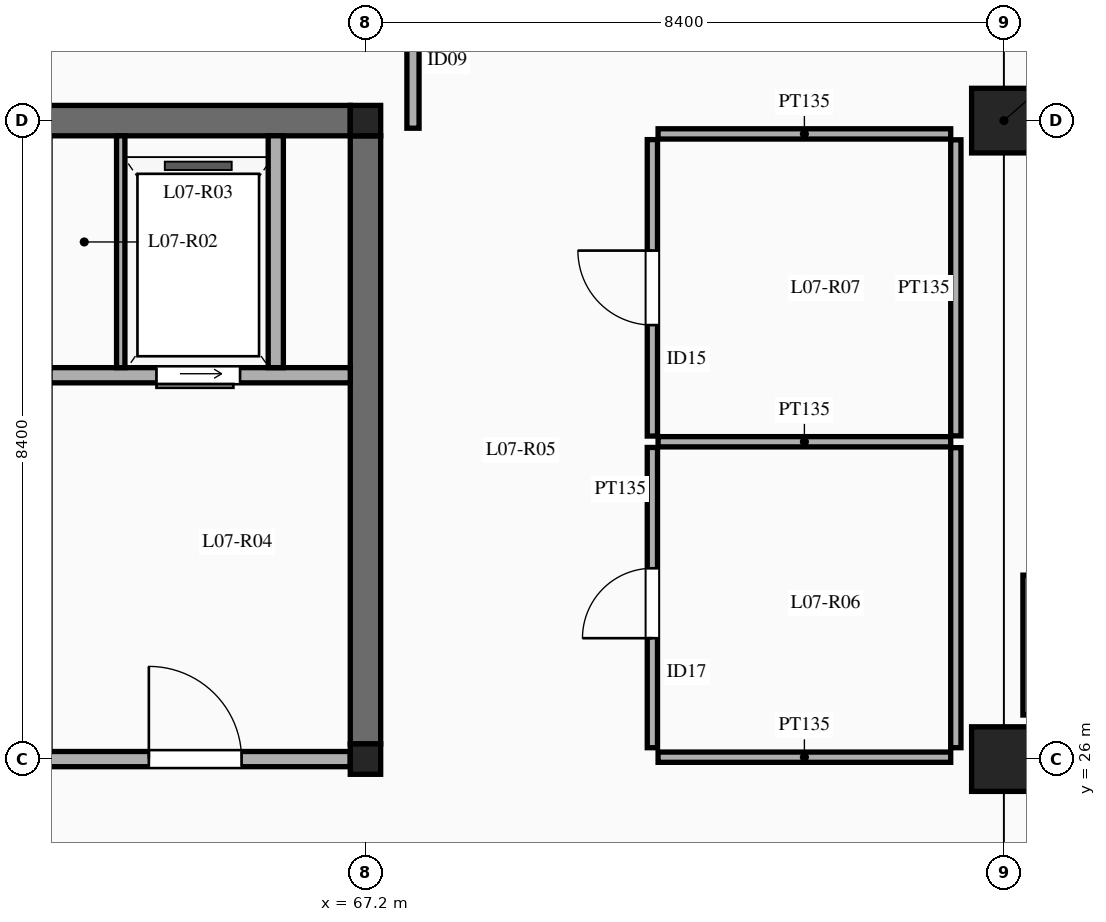
"""IFC4 building model, lengths in metres.
Left out: names, types, materials, properties, quantities, classifications, styles, units other than length and angle.
Written with IfcOpenShell. Run it as: python <this file> out.ifc"""

import sys

from ifc_helpers import new_model, si_unit, direction, frame, frame_2d, origin, origin_2d, place, context, subcontext, project, spatial, rectangle, extrude, element, fill, save


model = new_model("IFC4")
c1 = context("Model", 3, precision=1e-05, world=origin(), true_north=direction((0.0, 1.0)))
c2 = subcontext(c1, "Body", "Model", "MODEL_VIEW")
j1 = project(units=[si_unit("LENGTHUNIT", "METRE"), si_unit("PLANEANGLEUNIT", "RADIAN")], contexts=[c1])
p1 = place(None, origin())
s1 = spatial("IfcSite", under=j1, at=p1, CompositionType="ELEMENT")
p2 = place(p1, origin())
s2 = spatial("IfcBuilding", under=s1, at=p2, CompositionType="ELEMENT")
p3 = place(p2, frame((0.0, 0.0, 33.0)))
s3 = spatial("IfcBuildingStorey", under=s2, at=p3, CompositionType="ELEMENT", Elevation=33.0)
for number, where, z_axis, x_axis in (
    (1, (67.2, 26.0, 0.0), (0.0, 0.0, 1.0), (1.0, 0.0, 0.0)),
    (2, (67.2, 34.4, 0.0), (0.0, 0.0, 1.0), (1.0, 0.0, 0.0)),
):
    element("IfcColumn", number, at=place(p3, frame(where, z_axis=z_axis, x_axis=x_axis)), inside=s3, PredefinedType="COLUMN", context=c2, shape_type="SweptSolid", body=[
        extrude(rectangle(XDim=0.4, YDim=0.4, at=origin_2d()), origin(), (0.0, 0.0, 1.0), 4.5),
    ])
for number, where, z_axis, x_axis in (
    (3, (75.6, 26.0, 0.0), (0.0, 0.0, 1.0), (1.0, 0.0, 0.0)),
    (4, (75.6, 34.4, 0.0), (0.0, 0.0, 1.0), (1.0, 0.0, 0.0)),
):
    element("IfcColumn", number, at=place(p3, frame(where, z_axis=z_axis, x_axis=x_axis)), inside=s3, PredefinedType="COLUMN", context=c2, shape_type="SweptSolid", body=[
        extrude(rectangle(XDim=0.85, YDim=0.85, at=origin_2d()), origin(), (0.0, 0.0, 1.0), 4.5),
    ])
for number, where, z_axis, x_axis in (
    (5, (67.2, 26.2, 0.0), (0.0, 0.0, 1.0), (0.0, 1.0, 0.0)),
    (6, (59.0, 34.4, 0.0), (0.0, 0.0, 1.0), (1.0, 0.0, 0.0)),
):
    element("IfcWall", number, at=place(p3, frame(where, z_axis=z_axis, x_axis=x_axis)), inside=s3, PredefinedType="SHEAR", context=c2, shape_type="SweptSolid", body=[
        extrude(rectangle(XDim=8.0, YDim=0.4, at=frame_2d((4.0, 0.0))), origin(), (0.0, 0.0, 1.0), 4.5),
    ])
p4 = place(p3, frame((59.0, 26.0, 0.0), z_axis=(0.0, 0.0, 1.0), x_axis=(1.0, 0.0, 0.0)))
e7 = element("IfcWall", 7, at=p4, inside=s3, PredefinedType="SOLIDWALL", context=c2, shape_type="SweptSolid", body=[
    extrude(rectangle(XDim=8.0, YDim=0.2, at=frame_2d((4.0, 0.0))), origin(), (0.0, 0.0, 1.0), 3.73),
])
p5 = place(p4, frame((1.55, 0.0, 0.0)))
e8 = element("IfcOpeningElement", 8, at=p5, cuts=e7, PredefinedType="OPENING", context=c2, shape_type="SweptSolid", body=[
    extrude(rectangle(XDim=1.15, YDim=2.15, at=frame_2d((0.575, 1.075))), frame((0.0, 0.11, 0.0), z_axis=(0.0, -1.0, 0.0), x_axis=(1.0, 0.0, 0.0)), (0.0, 0.0, 1.0), 0.22),
])
p6 = place(p4, frame((5.35, 0.0, 0.0)))
e9 = element("IfcOpeningElement", 9, at=p6, cuts=e7, PredefinedType="OPENING", context=c2, shape_type="SweptSolid", body=[
    extrude(rectangle(XDim=1.22, YDim=2.15, at=frame_2d((0.61, 1.075))), frame((0.0, 0.11, 0.0), z_axis=(0.0, -1.0, 0.0), x_axis=(1.0, 0.0, 0.0)), (0.0, 0.0, 1.0), 0.22),
])
p7 = place(p3, frame((63.05, 31.05, 0.0), z_axis=(0.0, 0.0, 1.0), x_axis=(1.0, 0.0, 0.0)))
e10 = element("IfcWall", 10, at=p7, inside=s3, PredefinedType="SOLIDWALL", context=c2, shape_type="SweptSolid", body=[
    extrude(rectangle(XDim=3.95, YDim=0.2, at=frame_2d((1.975, 0.0))), origin(), (0.0, 0.0, 1.0), 4.3),
])
p8 = place(p7, frame((1.4, 0.0, 0.0)))
e11 = element("IfcOpeningElement", 11, at=p8, cuts=e10, PredefinedType="OPENING", context=c2, shape_type="SweptSolid", body=[
    extrude(rectangle(XDim=1.1, YDim=2.15, at=frame_2d((0.55, 1.075))), frame((0.0, 0.11, 0.0), z_axis=(0.0, -1.0, 0.0), x_axis=(1.0, 0.0, 0.0)), (0.0, 0.0, 1.0), 0.22),
])
p9 = place(p3, frame((63.98, 31.15, 0.0), z_axis=(0.0, 0.0, 1.0), x_axis=(0.0, 1.0, 0.0)))
e12 = element("IfcWall", 12, at=p9, inside=s3, PredefinedType="PARTITIONING", context=c2, shape_type="SweptSolid", body=[
    extrude(rectangle(XDim=3.05, YDim=0.11, at=frame_2d((1.525, 0.0))), origin(), (0.0, 0.0, 1.0), 4.3),
])
p10 = place(p3, frame((66.02, 31.15, 0.0), z_axis=(0.0, 0.0, 1.0), x_axis=(0.0, 1.0, 0.0)))
e13 = element("IfcWall", 13, at=p10, inside=s3, PredefinedType="SOLIDWALL", context=c2, shape_type="SweptSolid", body=[
    extrude(rectangle(XDim=3.05, YDim=0.2, at=frame_2d((1.525, 0.0))), origin(), (0.0, 0.0, 1.0), 4.3),
])
p11 = place(p3, frame((75.95, 26.58, 0.0), z_axis=(0.0, 0.0, 1.0), x_axis=(0.0, 1.0, 0.0)))
e14 = element("IfcWall", 14, at=p11, inside=s3, PredefinedType="SOLIDWALL", context=c2, shape_type="SweptSolid", body=[
    extrude(rectangle(XDim=1.84, YDim=0.2, at=frame_2d((0.92, 0.0))), origin(), (0.0, 0.0, 1.0), 4.3),
])
p12 = place(p3, frame((70.975, 26.15, 0.0), z_axis=(0.0, 0.0, 1.0), x_axis=(0.0, 1.0, 0.0)))
e15 = element("IfcWall", 15, at=p12, inside=s3, PredefinedType="PARTITIONING", context=c2, shape_type="SweptSolid", body=[
    extrude(rectangle(XDim=3.95, YDim=0.135, at=frame_2d((1.975, 0.0))), origin(), (0.0, 0.0, 1.0), 3.45),
])
p13 = place(p12, frame((1.441, 0.0, 0.0)))
e16 = element("IfcOpeningElement", 16, at=p13, cuts=e15, PredefinedType="OPENING", context=c2, shape_type="SweptSolid", body=[
    extrude(rectangle(XDim=0.92, YDim=2.12, at=frame_2d((0.46, 1.06))), frame((0.0, 0.077, 0.0), z_axis=(0.0, -1.0, 0.0), x_axis=(1.0, 0.0, 0.0)), (0.0, 0.0, 1.0), 0.155),
])
p14 = place(p3, frame((70.975, 30.25, 0.0), z_axis=(0.0, 0.0, 1.0), x_axis=(0.0, 1.0, 0.0)))
e17 = element("IfcWall", 17, at=p14, inside=s3, PredefinedType="PARTITIONING", context=c2, shape_type="SweptSolid", body=[
    extrude(rectangle(XDim=3.9, YDim=0.135, at=frame_2d((1.95, 0.0))), origin(), (0.0, 0.0, 1.0), 3.45),
])
p15 = place(p14, frame((1.46, 0.0, 0.0)))
e18 = element("IfcOpeningElement", 18, at=p15, cuts=e17, PredefinedType="OPENING", context=c2, shape_type="SweptSolid", body=[
    extrude(rectangle(XDim=0.98, YDim=2.15, at=frame_2d((0.49, 1.075))), frame((0.0, 0.077, 0.0), z_axis=(0.0, -1.0, 0.0), x_axis=(1.0, 0.0, 0.0)), (0.0, 0.0, 1.0), 0.155),
])
for number, where, z_axis, x_axis in (
    (19, (71.05, 30.175, 0.0), (0.0, 0.0, 1.0), (1.0, 0.0, 0.0)),
    (20, (71.05, 26.025, 0.0), (0.0, 0.0, 1.0), (1.0, 0.0, 0.0)),
    (21, (71.05, 34.225, 0.0), (0.0, 0.0, 1.0), (1.0, 0.0, 0.0)),
):
    element("IfcWall", number, at=place(p3, frame(where, z_axis=z_axis, x_axis=x_axis)), inside=s3, PredefinedType="PARTITIONING", context=c2, shape_type="SweptSolid", body=[
        extrude(rectangle(XDim=3.85, YDim=0.135, at=frame_2d((1.925, 0.0))), origin(), (0.0, 0.0, 1.0), 3.45),
    ])
p16 = place(p3, frame((67.825, 34.3, 0.0), z_axis=(0.0, 0.0, 1.0), x_axis=(0.0, 1.0, 0.0)))
e22 = element("IfcWall", 22, at=p16, inside=s3, PredefinedType="PARTITIONING", context=c2, shape_type="SweptSolid", body=[
    extrude(rectangle(XDim=2.75, YDim=0.16, at=frame_2d((1.375, 0.0))), origin(), (0.0, 0.0, 1.0), 3.45),
])
p17 = place(p16, frame((1.34, 0.0, 0.0)))
e23 = element("IfcOpeningElement", 23, at=p17, cuts=e22, PredefinedType="OPENING", context=c2, shape_type="SweptSolid", body=[
    extrude(rectangle(XDim=1.16, YDim=2.2, at=frame_2d((0.58, 1.1))), frame((0.0, 0.09, 0.0), z_axis=(0.0, -1.0, 0.0), x_axis=(1.0, 0.0, 0.0)), (0.0, 0.0, 1.0), 0.18),
])
p18 = place(p3, frame((74.968, 26.15, 0.0), z_axis=(0.0, 0.0, 1.0), x_axis=(0.0, 1.0, 0.0)))
e24 = element("IfcWall", 24, at=p18, inside=s3, PredefinedType="PARTITIONING", context=c2, shape_type="SweptSolid", body=[
    extrude(rectangle(XDim=3.948, YDim=0.135, at=frame_2d((1.974, 0.0))), origin(), (0.0, 0.0, 1.0), 3.45),
])
p19 = place(p3, frame((74.968, 30.252, 0.0), z_axis=(0.0, 0.0, 1.0), x_axis=(0.0, 1.0, 0.0)))
e25 = element("IfcWall", 25, at=p19, inside=s3, PredefinedType="PARTITIONING", context=c2, shape_type="SweptSolid", body=[
    extrude(rectangle(XDim=3.895, YDim=0.135, at=frame_2d((1.948, 0.0))), origin(), (0.0, 0.0, 1.0), 3.45),
])
p20 = place(p6, origin())
e26 = element("IfcDoor", 26, at=p20, inside=s3, OperationType="SINGLE_SWING_LEFT", PredefinedType="DOOR", context=c2, shape_type="SweptSolid", body=[
    extrude(rectangle(XDim=1.22, YDim=2.15, at=frame_2d((0.61, 1.075))), frame((0.0, 0.025, 0.0), z_axis=(0.0, -1.0, 0.0), x_axis=(1.0, 0.0, 0.0)), (0.0, 0.0, 1.0), 0.05),
])
fill(e9, e26)
p21 = place(p8, frame((1.1, 0.0, 0.0), z_axis=(0.0, 0.0, 1.0), x_axis=(-1.0, 0.0, 0.0)))
e27 = element("IfcDoor", 27, at=p21, inside=s3, OperationType="SLIDING_TO_LEFT", PredefinedType="DOOR", context=c2, shape_type="SweptSolid", body=[
    extrude(rectangle(XDim=1.1, YDim=2.15, at=frame_2d((0.55, 1.075))), frame((0.0, 0.025, 0.0), z_axis=(0.0, -1.0, 0.0), x_axis=(1.0, 0.0, 0.0)), (0.0, 0.0, 1.0), 0.05),
])
fill(e11, e27)
p22 = place(p13, origin())
e28 = element("IfcDoor", 28, at=p22, inside=s3, OperationType="SINGLE_SWING_LEFT", PredefinedType="DOOR", context=c2, shape_type="SweptSolid", body=[
    extrude(rectangle(XDim=0.92, YDim=2.12, at=frame_2d((0.46, 1.06))), frame((0.0, 0.025, 0.0), z_axis=(0.0, -1.0, 0.0), x_axis=(1.0, 0.0, 0.0)), (0.0, 0.0, 1.0), 0.05),
])
fill(e16, e28)
p23 = place(p15, origin())
e29 = element("IfcDoor", 29, at=p23, inside=s3, OperationType="SINGLE_SWING_RIGHT", PredefinedType="DOOR", context=c2, shape_type="SweptSolid", body=[
    extrude(rectangle(XDim=0.98, YDim=2.15, at=frame_2d((0.49, 1.075))), frame((0.0, 0.025, 0.0), z_axis=(0.0, -1.0, 0.0), x_axis=(1.0, 0.0, 0.0)), (0.0, 0.0, 1.0), 0.05),
])
fill(e18, e29)
save(model, sys.argv[1])
